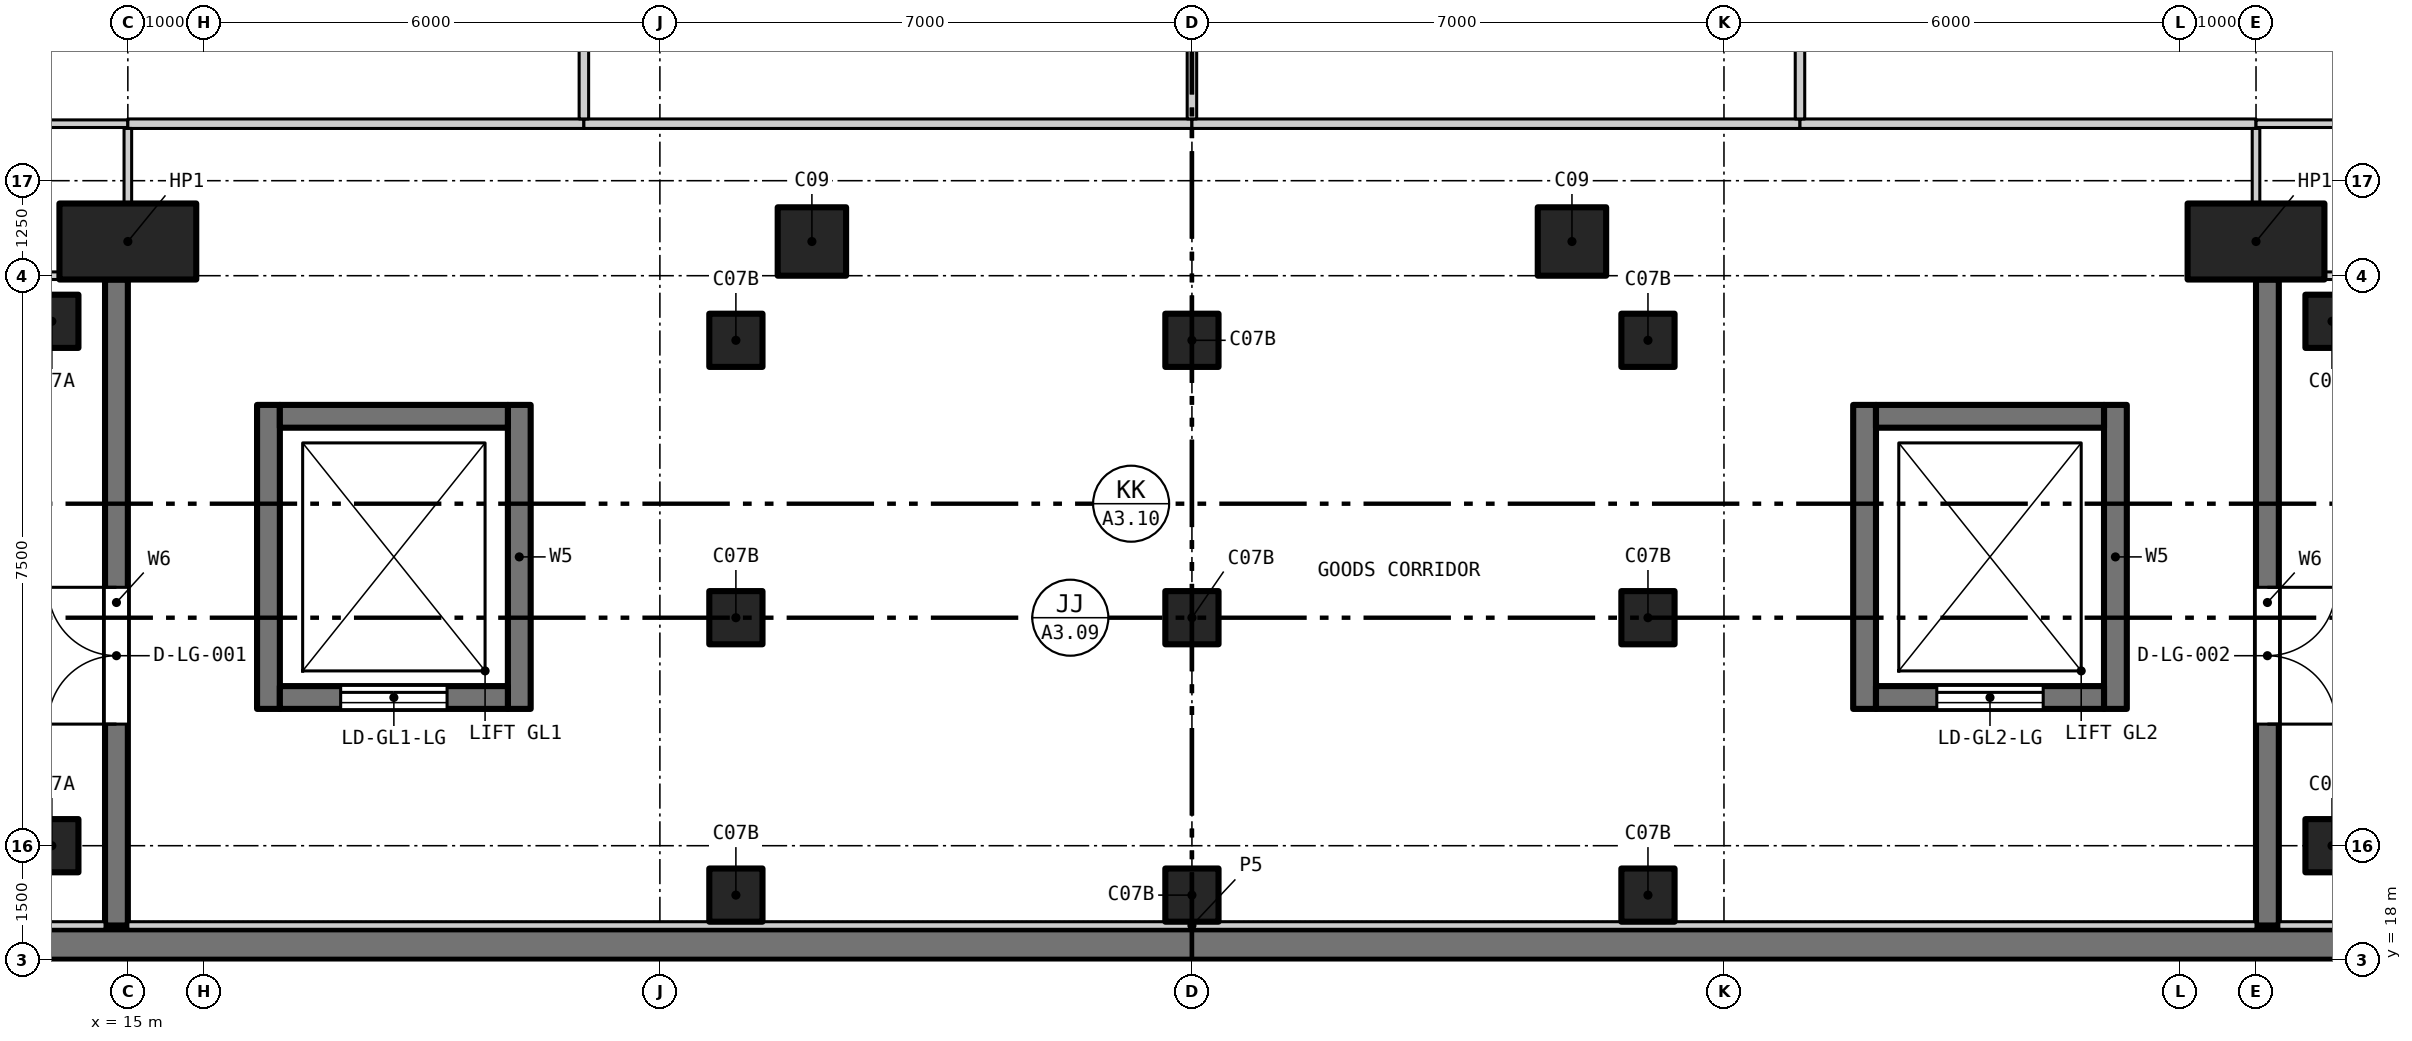
"""IFC4 building model, lengths in metres.
Left out: names, types, materials, properties, quantities, classifications, styles, units other than length and angle.
Written with IfcOpenShell. Run it as: python <this file> out.ifc"""

import sys

from ifc_helpers import new_model, si_unit, direction, frame, frame_2d, origin, origin_2d, place, context, subcontext, project, spatial, rectangle, extrude, element, fill, save


model = new_model("IFC4")
c1 = context("Model", 3, precision=1e-05, world=origin(), true_north=direction((0.0, 1.0)))
c2 = subcontext(c1, "Body", "Model", "MODEL_VIEW")
j1 = project(units=[si_unit("LENGTHUNIT", "METRE"), si_unit("PLANEANGLEUNIT", "RADIAN")], contexts=[c1])
p1 = place(None, origin())
s1 = spatial("IfcSite", under=j1, at=p1, CompositionType="ELEMENT")
p2 = place(p1, origin())
s2 = spatial("IfcBuilding", under=s1, at=p2, CompositionType="ELEMENT")
p3 = place(p2, frame((0.0, 0.0, -5.0)))
s3 = spatial("IfcBuildingStorey", under=s2, at=p3, CompositionType="ELEMENT", Elevation=-5.0)
for number, where, z_axis, x_axis in (
    (1, (24.0, 27.45, 0.0), (0.0, 0.0, 1.0), (1.0, 0.0, 0.0)),
    (2, (34.0, 27.45, 0.0), (0.0, 0.0, 1.0), (1.0, 0.0, 0.0)),
):
    element("IfcColumn", number, at=place(p3, frame(where, z_axis=z_axis, x_axis=x_axis)), inside=s3, PredefinedType="COLUMN", context=c2, shape_type="SweptSolid", body=[
        extrude(rectangle(XDim=0.9, YDim=0.9, at=origin_2d()), origin(), (0.0, 0.0, 1.0), 4.65),
    ])
for number, where, z_axis, x_axis in (
    (3, (14.0, 19.5, 0.0), (0.0, 0.0, 1.0), (1.0, 0.0, 0.0)),
    (4, (14.0, 26.4, 0.0), (0.0, 0.0, 1.0), (1.0, 0.0, 0.0)),
    (5, (44.0, 19.5, 0.0), (0.0, 0.0, 1.0), (1.0, 0.0, 0.0)),
    (6, (44.0, 26.4, 0.0), (0.0, 0.0, 1.0), (1.0, 0.0, 0.0)),
):
    element("IfcColumn", number, at=place(p3, frame(where, z_axis=z_axis, x_axis=x_axis)), inside=s3, PredefinedType="COLUMN", context=c2, shape_type="SweptSolid", body=[
        extrude(rectangle(XDim=0.7, YDim=0.7, at=origin_2d()), origin(), (0.0, 0.0, 1.0), 5.0),
    ])
for number, where, z_axis, x_axis in (
    (7, (23.0, 22.5, 0.0), (0.0, 0.0, 1.0), (1.0, 0.0, 0.0)),
    (8, (29.0, 22.5, 0.0), (0.0, 0.0, 1.0), (1.0, 0.0, 0.0)),
    (9, (35.0, 22.5, 0.0), (0.0, 0.0, 1.0), (1.0, 0.0, 0.0)),
    (10, (23.0, 26.15, 0.0), (0.0, 0.0, 1.0), (1.0, 0.0, 0.0)),
    (11, (29.0, 26.15, 0.0), (0.0, 0.0, 1.0), (1.0, 0.0, 0.0)),
    (12, (35.0, 26.15, 0.0), (0.0, 0.0, 1.0), (1.0, 0.0, 0.0)),
    (13, (23.0, 18.85, 0.0), (0.0, 0.0, 1.0), (1.0, 0.0, 0.0)),
    (14, (29.0, 18.85, 0.0), (0.0, 0.0, 1.0), (1.0, 0.0, 0.0)),
    (15, (35.0, 18.85, 0.0), (0.0, 0.0, 1.0), (1.0, 0.0, 0.0)),
):
    element("IfcColumn", number, at=place(p3, frame(where, z_axis=z_axis, x_axis=x_axis)), inside=s3, PredefinedType="COLUMN", context=c2, shape_type="SweptSolid", body=[
        extrude(rectangle(XDim=0.7, YDim=0.7, at=origin_2d()), origin(), (0.0, 0.0, 1.0), 4.7),
    ])
p4 = place(p3, frame((0.4, 18.2, 0.0), z_axis=(0.0, 0.0, 1.0), x_axis=(1.0, 0.0, 0.0)))
e16 = element("IfcWall", 16, at=p4, inside=s3, PredefinedType="SOLIDWALL", context=c2, shape_type="SweptSolid", body=[
    extrude(rectangle(XDim=57.2, YDim=0.4, at=frame_2d((28.6, 0.0))), origin(), (0.0, 0.0, 1.0), 5.0),
])
p5 = place(p3, frame((14.85, 18.45, 0.0), z_axis=(0.0, 0.0, 1.0), x_axis=(0.0, 1.0, 0.0)))
e17 = element("IfcWall", 17, at=p5, inside=s3, PredefinedType="SOLIDWALL", context=c2, shape_type="SweptSolid", body=[
    extrude(rectangle(XDim=8.5, YDim=0.3, at=frame_2d((4.25, 0.0))), origin(), (0.0, 0.0, 1.0), 5.0),
])
p6 = place(p5, frame((2.65, 0.0, 0.0)))
e18 = element("IfcOpeningElement", 18, at=p6, cuts=e17, PredefinedType="OPENING", context=c2, shape_type="SweptSolid", body=[
    extrude(rectangle(XDim=1.8, YDim=2.1, at=frame_2d((0.9, 1.05))), frame((0.0, 0.16, 0.0), z_axis=(0.0, -1.0, 0.0), x_axis=(1.0, 0.0, 0.0)), (0.0, 0.0, 1.0), 0.32),
])
p7 = place(p3, frame((43.15, 18.45, 0.0), z_axis=(0.0, 0.0, 1.0), x_axis=(0.0, 1.0, 0.0)))
e19 = element("IfcWall", 19, at=p7, inside=s3, PredefinedType="SOLIDWALL", context=c2, shape_type="SweptSolid", body=[
    extrude(rectangle(XDim=8.5, YDim=0.3, at=frame_2d((4.25, 0.0))), origin(), (0.0, 0.0, 1.0), 5.0),
])
p8 = place(p7, frame((2.65, 0.0, 0.0)))
e20 = element("IfcOpeningElement", 20, at=p8, cuts=e19, PredefinedType="OPENING", context=c2, shape_type="SweptSolid", body=[
    extrude(rectangle(XDim=1.8, YDim=2.1, at=frame_2d((0.9, 1.05))), frame((0.0, 0.16, 0.0), z_axis=(0.0, -1.0, 0.0), x_axis=(1.0, 0.0, 0.0)), (0.0, 0.0, 1.0), 0.32),
])
for number, where, z_axis, x_axis in (
    (21, (16.85, 21.3, 0.0), (0.0, 0.0, 1.0), (0.0, 1.0, 0.0)),
    (22, (20.15, 21.3, 0.0), (0.0, 0.0, 1.0), (0.0, 1.0, 0.0)),
):
    element("IfcWall", number, at=place(p3, frame(where, z_axis=z_axis, x_axis=x_axis)), inside=s3, PredefinedType="SHEAR", context=c2, shape_type="SweptSolid", body=[
        extrude(rectangle(XDim=4.0, YDim=0.3, at=frame_2d((2.0, 0.0))), origin(), (0.0, 0.0, 1.0), 5.0),
    ])
p9 = place(p3, frame((17.0, 21.45, 0.0), z_axis=(0.0, 0.0, 1.0), x_axis=(1.0, 0.0, 0.0)))
e23 = element("IfcWall", 23, at=p9, inside=s3, PredefinedType="SHEAR", context=c2, shape_type="SweptSolid", body=[
    extrude(rectangle(XDim=3.0, YDim=0.3, at=frame_2d((1.5, 0.0))), origin(), (0.0, 0.0, 1.0), 5.0),
])
p10 = place(p9, frame((0.8, 0.0, 0.0)))
e24 = element("IfcOpeningElement", 24, at=p10, cuts=e23, PredefinedType="OPENING", context=c2, shape_type="SweptSolid", body=[
    extrude(rectangle(XDim=1.4, YDim=2.1, at=frame_2d((0.7, 1.05))), frame((0.0, 0.16, 0.0), z_axis=(0.0, -1.0, 0.0), x_axis=(1.0, 0.0, 0.0)), (0.0, 0.0, 1.0), 0.32),
])
p11 = place(p3, frame((17.0, 25.15, 0.0), z_axis=(0.0, 0.0, 1.0), x_axis=(1.0, 0.0, 0.0)))
e25 = element("IfcWall", 25, at=p11, inside=s3, PredefinedType="SHEAR", context=c2, shape_type="SweptSolid", body=[
    extrude(rectangle(XDim=3.0, YDim=0.3, at=frame_2d((1.5, 0.0))), origin(), (0.0, 0.0, 1.0), 5.0),
])
for number, where, z_axis, x_axis in (
    (26, (37.85, 21.3, 0.0), (0.0, 0.0, 1.0), (0.0, 1.0, 0.0)),
    (27, (41.15, 21.3, 0.0), (0.0, 0.0, 1.0), (0.0, 1.0, 0.0)),
):
    element("IfcWall", number, at=place(p3, frame(where, z_axis=z_axis, x_axis=x_axis)), inside=s3, PredefinedType="SHEAR", context=c2, shape_type="SweptSolid", body=[
        extrude(rectangle(XDim=4.0, YDim=0.3, at=frame_2d((2.0, 0.0))), origin(), (0.0, 0.0, 1.0), 5.0),
    ])
p12 = place(p3, frame((38.0, 21.45, 0.0), z_axis=(0.0, 0.0, 1.0), x_axis=(1.0, 0.0, 0.0)))
e28 = element("IfcWall", 28, at=p12, inside=s3, PredefinedType="SHEAR", context=c2, shape_type="SweptSolid", body=[
    extrude(rectangle(XDim=3.0, YDim=0.3, at=frame_2d((1.5, 0.0))), origin(), (0.0, 0.0, 1.0), 5.0),
])
p13 = place(p12, frame((0.8, 0.0, 0.0)))
e29 = element("IfcOpeningElement", 29, at=p13, cuts=e28, PredefinedType="OPENING", context=c2, shape_type="SweptSolid", body=[
    extrude(rectangle(XDim=1.4, YDim=2.1, at=frame_2d((0.7, 1.05))), frame((0.0, 0.16, 0.0), z_axis=(0.0, -1.0, 0.0), x_axis=(1.0, 0.0, 0.0)), (0.0, 0.0, 1.0), 0.32),
])
p14 = place(p3, frame((38.0, 25.15, 0.0), z_axis=(0.0, 0.0, 1.0), x_axis=(1.0, 0.0, 0.0)))
e30 = element("IfcWall", 30, at=p14, inside=s3, PredefinedType="SHEAR", context=c2, shape_type="SweptSolid", body=[
    extrude(rectangle(XDim=3.0, YDim=0.3, at=frame_2d((1.5, 0.0))), origin(), (0.0, 0.0, 1.0), 5.0),
])
for number, where, z_axis, x_axis in (
    (31, (15.0, 27.45, 0.0), (0.0, 0.0, 1.0), (1.0, 0.0, 0.0)),
    (32, (43.0, 27.45, 0.0), (0.0, 0.0, 1.0), (1.0, 0.0, 0.0)),
):
    element("IfcColumn", number, at=place(p3, frame(where, z_axis=z_axis, x_axis=x_axis)), inside=s3, PredefinedType="COLUMN", context=c2, shape_type="SweptSolid", body=[
        extrude(rectangle(XDim=1.8, YDim=1.0, at=origin_2d()), origin(), (0.0, 0.0, 1.0), 5.0),
    ])
p15 = place(p3, frame((6.61, 18.45, 0.0), z_axis=(0.0, 0.0, 1.0), x_axis=(1.0, 0.0, 0.0)))
e33 = element("IfcWall", 33, at=p15, inside=s3, PredefinedType="PARTITIONING", context=c2, shape_type="SweptSolid", body=[
    extrude(rectangle(XDim=8.09, YDim=0.1, at=frame_2d((4.045, 0.0))), origin(), (0.0, 0.0, 1.0), 4.7),
])
p16 = place(p3, frame((15.0, 18.45, 0.0), z_axis=(0.0, 0.0, 1.0), x_axis=(1.0, 0.0, 0.0)))
e34 = element("IfcWall", 34, at=p16, inside=s3, PredefinedType="PARTITIONING", context=c2, shape_type="SweptSolid", body=[
    extrude(rectangle(XDim=28.0, YDim=0.1, at=frame_2d((14.0, 0.0))), origin(), (0.0, 0.0, 1.0), 4.65),
])
p17 = place(p3, frame((43.3, 18.45, 0.0), z_axis=(0.0, 0.0, 1.0), x_axis=(1.0, 0.0, 0.0)))
e35 = element("IfcWall", 35, at=p17, inside=s3, PredefinedType="PARTITIONING", context=c2, shape_type="SweptSolid", body=[
    extrude(rectangle(XDim=8.11, YDim=0.1, at=frame_2d((4.055, 0.0))), origin(), (0.0, 0.0, 1.0), 4.7),
])
for number, where, z_axis, x_axis in (
    (36, (12.65, 27.0, 0.0), (0.0, 0.0, 1.0), (1.0, 0.0, 0.0)),
    (37, (43.9, 27.0, 0.0), (0.0, 0.0, 1.0), (1.0, 0.0, 0.0)),
):
    element("IfcWall", number, at=place(p3, frame(where, z_axis=z_axis, x_axis=x_axis)), inside=s3, PredefinedType="PARTITIONING", context=c2, shape_type="SweptSolid", body=[
        extrude(rectangle(XDim=1.45, YDim=0.1, at=frame_2d((0.725, 0.0))), origin(), (0.0, 0.0, 1.0), 4.7),
    ])
p18 = place(p3, frame((12.712, 29.0, 0.0), z_axis=(0.0, 0.0, 1.0), x_axis=(1.0, 0.0, 0.0)))
e38 = element("IfcWall", 38, at=p18, inside=s3, PredefinedType="PARTITIONING", context=c2, shape_type="SweptSolid", body=[
    extrude(rectangle(XDim=2.288, YDim=0.1, at=frame_2d((1.144, 0.0))), origin(), (0.0, 0.0, 1.0), 4.65),
])
p19 = place(p3, frame((15.0, 29.0, 0.0), z_axis=(0.0, 0.0, 1.0), x_axis=(1.0, 0.0, 0.0)))
e39 = element("IfcWall", 39, at=p19, inside=s3, PredefinedType="PARTITIONING", context=c2, shape_type="SweptSolid", body=[
    extrude(rectangle(XDim=6.0, YDim=0.125, at=frame_2d((3.0, 0.0))), origin(), (0.0, 0.0, 1.0), 4.65),
])
for number, where, z_axis, x_axis in (
    (40, (21.0, 29.0, 0.0), (0.0, 0.0, 1.0), (1.0, 0.0, 0.0)),
    (41, (29.0, 29.0, 0.0), (0.0, 0.0, 1.0), (1.0, 0.0, 0.0)),
):
    element("IfcWall", number, at=place(p3, frame(where, z_axis=z_axis, x_axis=x_axis)), inside=s3, PredefinedType="PARTITIONING", context=c2, shape_type="SweptSolid", body=[
        extrude(rectangle(XDim=8.0, YDim=0.125, at=frame_2d((4.0, 0.0))), origin(), (0.0, 0.0, 1.0), 4.65),
    ])
p20 = place(p3, frame((37.0, 29.0, 0.0), z_axis=(0.0, 0.0, 1.0), x_axis=(1.0, 0.0, 0.0)))
e42 = element("IfcWall", 42, at=p20, inside=s3, PredefinedType="PARTITIONING", context=c2, shape_type="SweptSolid", body=[
    extrude(rectangle(XDim=6.0, YDim=0.125, at=frame_2d((3.0, 0.0))), origin(), (0.0, 0.0, 1.0), 4.65),
])
p21 = place(p3, frame((43.0, 29.0, 0.0), z_axis=(0.0, 0.0, 1.0), x_axis=(1.0, 0.0, 0.0)))
e43 = element("IfcWall", 43, at=p21, inside=s3, PredefinedType="PARTITIONING", context=c2, shape_type="SweptSolid", body=[
    extrude(rectangle(XDim=2.288, YDim=0.1, at=frame_2d((1.144, 0.0))), origin(), (0.0, 0.0, 1.0), 4.65),
])
p22 = place(p3, frame((15.0, 27.95, 0.0), z_axis=(0.0, 0.0, 1.0), x_axis=(0.0, 1.0, 0.0)))
e44 = element("IfcWall", 44, at=p22, inside=s3, PredefinedType="PARTITIONING", context=c2, shape_type="SweptSolid", body=[
    extrude(rectangle(XDim=0.988, YDim=0.1, at=frame_2d((0.494, 0.0))), origin(), (0.0, 0.0, 1.0), 4.65),
])
for number, where, z_axis, x_axis in (
    (45, (21.0, 29.062, 0.0), (0.0, 0.0, 1.0), (0.0, 1.0, 0.0)),
    (46, (29.0, 29.062, 0.0), (0.0, 0.0, 1.0), (0.0, 1.0, 0.0)),
    (47, (37.0, 29.062, 0.0), (0.0, 0.0, 1.0), (0.0, 1.0, 0.0)),
):
    element("IfcWall", number, at=place(p3, frame(where, z_axis=z_axis, x_axis=x_axis)), inside=s3, PredefinedType="PARTITIONING", context=c2, shape_type="SweptSolid", body=[
        extrude(rectangle(XDim=12.837, YDim=0.125, at=frame_2d((6.419, 0.0))), origin(), (0.0, 0.0, 1.0), 4.65),
    ])
p23 = place(p3, frame((43.0, 27.95, 0.0), z_axis=(0.0, 0.0, 1.0), x_axis=(0.0, 1.0, 0.0)))
e48 = element("IfcWall", 48, at=p23, inside=s3, PredefinedType="PARTITIONING", context=c2, shape_type="SweptSolid", body=[
    extrude(rectangle(XDim=0.988, YDim=0.1, at=frame_2d((0.494, 0.0))), origin(), (0.0, 0.0, 1.0), 4.65),
])
p24 = place(p6, origin())
e49 = element("IfcDoor", 49, at=p24, inside=s3, OperationType="DOUBLE_DOOR_SINGLE_SWING", PredefinedType="DOOR", context=c2, shape_type="SweptSolid", body=[
    extrude(rectangle(XDim=1.8, YDim=2.1, at=frame_2d((0.9, 1.05))), frame((0.0, 0.025, 0.0), z_axis=(0.0, -1.0, 0.0), x_axis=(1.0, 0.0, 0.0)), (0.0, 0.0, 1.0), 0.05),
])
fill(e18, e49)
p25 = place(p8, frame((1.8, 0.0, 0.0), z_axis=(0.0, 0.0, 1.0), x_axis=(-1.0, 0.0, 0.0)))
e50 = element("IfcDoor", 50, at=p25, inside=s3, OperationType="DOUBLE_DOOR_SINGLE_SWING", PredefinedType="DOOR", context=c2, shape_type="SweptSolid", body=[
    extrude(rectangle(XDim=1.8, YDim=2.1, at=frame_2d((0.9, 1.05))), frame((0.0, 0.025, 0.0), z_axis=(0.0, -1.0, 0.0), x_axis=(1.0, 0.0, 0.0)), (0.0, 0.0, 1.0), 0.05),
])
fill(e20, e50)
p26 = place(p10, origin())
e51 = element("IfcDoor", 51, at=p26, inside=s3, OperationType="DOUBLE_DOOR_SLIDING", PredefinedType="DOOR", context=c2, shape_type="SweptSolid", body=[
    extrude(rectangle(XDim=1.4, YDim=2.1, at=frame_2d((0.7, 1.05))), frame((0.0, 0.025, 0.0), z_axis=(0.0, -1.0, 0.0), x_axis=(1.0, 0.0, 0.0)), (0.0, 0.0, 1.0), 0.05),
])
fill(e24, e51)
p27 = place(p13, origin())
e52 = element("IfcDoor", 52, at=p27, inside=s3, OperationType="DOUBLE_DOOR_SLIDING", PredefinedType="DOOR", context=c2, shape_type="SweptSolid", body=[
    extrude(rectangle(XDim=1.4, YDim=2.1, at=frame_2d((0.7, 1.05))), frame((0.0, 0.025, 0.0), z_axis=(0.0, -1.0, 0.0), x_axis=(1.0, 0.0, 0.0)), (0.0, 0.0, 1.0), 0.05),
])
fill(e29, e52)
save(model, sys.argv[1])
